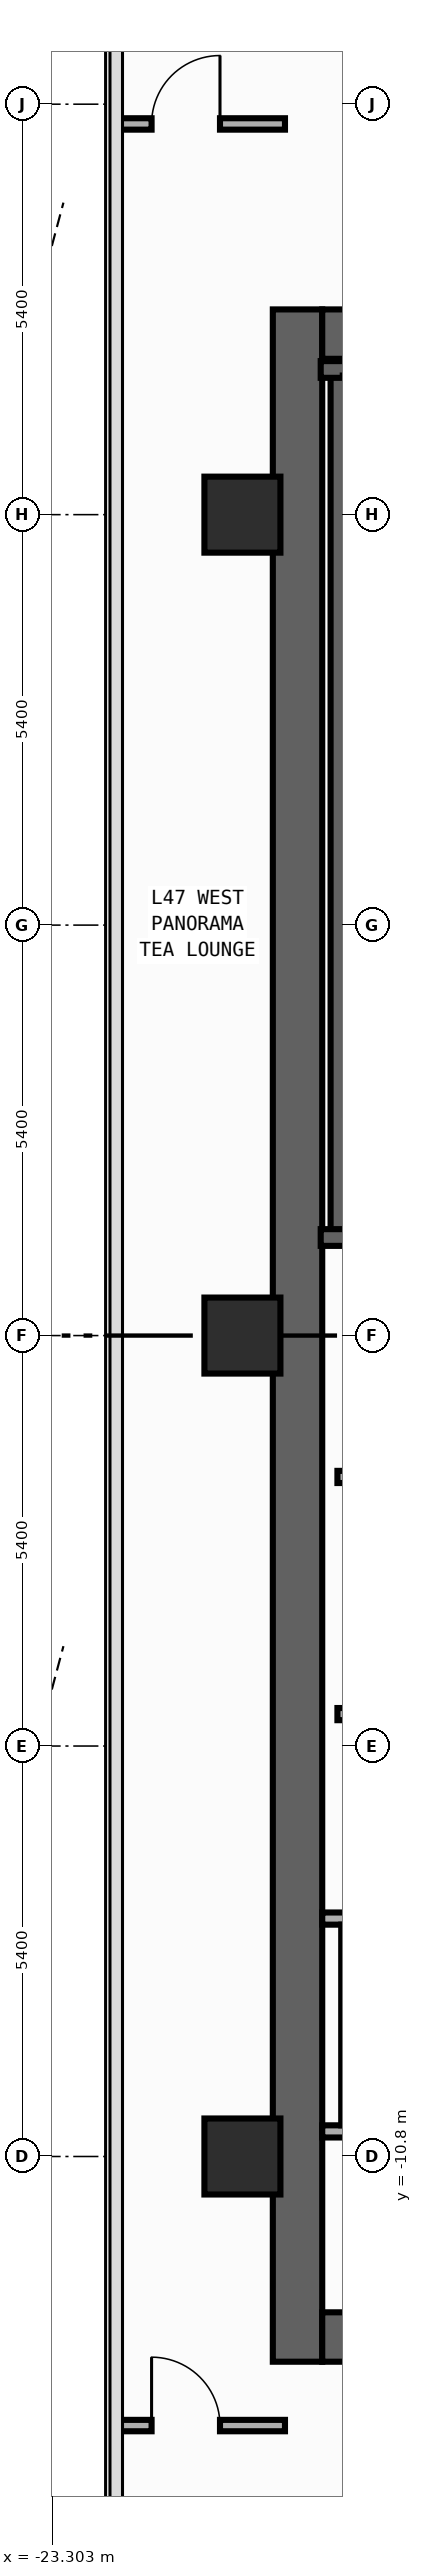
"""IFC4 building model, lengths in metres.
Left out: names, types, materials, properties, quantities, classifications, styles, units other than length and angle.
Written with IfcOpenShell. Run it as: python <this file> out.ifc"""

import sys

from ifc_helpers import new_model, si_unit, direction, frame, frame_2d, origin, origin_2d, place, context, subcontext, project, spatial, rectangle, extrude, element, fill, save


model = new_model("IFC4")
c1 = context("Model", 3, precision=1e-05, world=origin(), true_north=direction((0.0, 1.0)))
c2 = subcontext(c1, "Body", "Model", "MODEL_VIEW")
j1 = project(units=[si_unit("LENGTHUNIT", "METRE"), si_unit("PLANEANGLEUNIT", "RADIAN")], contexts=[c1])
p1 = place(None, origin())
s1 = spatial("IfcSite", under=j1, at=p1, CompositionType="ELEMENT")
p2 = place(p1, origin())
s2 = spatial("IfcBuilding", under=s1, at=p2, CompositionType="ELEMENT")
p3 = place(p2, frame((0.0, 0.0, 203.0)))
s3 = spatial("IfcBuildingStorey", under=s2, at=p3, CompositionType="ELEMENT", Elevation=203.0)
p4 = place(p3, frame((-20.075, -13.5, 0.0), z_axis=(0.0, 0.0, 1.0), x_axis=(0.0, 1.0, 0.0)))
e1 = element("IfcWall", 1, at=p4, inside=s3, PredefinedType="SHEAR", context=c2, shape_type="SweptSolid", body=[
    extrude(rectangle(XDim=27.0, YDim=0.65, at=frame_2d((13.5, 0.0))), origin(), (0.0, 0.0, 1.0), 3.54),
])
for number, where, z_axis, x_axis in (
    (2, (-19.75, -13.175, 0.0), (0.0, 0.0, 1.0), (1.0, 0.0, 0.0)),
    (3, (-19.75, 13.175, 0.0), (0.0, 0.0, 1.0), (1.0, 0.0, 0.0)),
):
    element("IfcWall", number, at=place(p3, frame(where, z_axis=z_axis, x_axis=x_axis)), inside=s3, PredefinedType="SHEAR", context=c2, shape_type="SweptSolid", body=[
        extrude(rectangle(XDim=7.1, YDim=0.65, at=frame_2d((3.55, 0.0))), origin(), (0.0, 0.0, 1.0), 3.54),
    ])
p5 = place(p3, frame((-19.53, 1.29, 0.0), z_axis=(0.0, 0.0, 1.0), x_axis=(0.0, 1.0, 0.0)))
e4 = element("IfcWall", 4, at=p5, inside=s3, PredefinedType="SHEAR", context=c2, shape_type="SweptSolid", body=[
    extrude(rectangle(XDim=11.42, YDim=0.22, at=frame_2d((5.71, 0.0))), origin(), (0.0, 0.0, 1.0), 3.54),
])
p6 = place(p3, frame((-19.77, 12.71, 0.0), z_axis=(0.0, 0.0, 1.0), x_axis=(1.0, 0.0, 0.0)))
e5 = element("IfcWall", 5, at=p6, inside=s3, PredefinedType="SHEAR", context=c2, shape_type="SweptSolid", body=[
    extrude(rectangle(XDim=4.065, YDim=0.22, at=frame_2d((2.032, 0.0))), origin(), (0.0, 0.0, 1.0), 3.54),
])
p7 = place(p3, frame((-19.77, 1.29, 0.0), z_axis=(0.0, 0.0, 1.0), x_axis=(1.0, 0.0, 0.0)))
e6 = element("IfcWall", 6, at=p7, inside=s3, PredefinedType="SHEAR", context=c2, shape_type="SweptSolid", body=[
    extrude(rectangle(XDim=4.065, YDim=0.22, at=frame_2d((2.032, 0.0))), origin(), (0.0, 0.0, 1.0), 3.54),
])
p8 = place(p7, frame((1.08, 0.0, 0.0)))
e7 = element("IfcOpeningElement", 7, at=p8, cuts=e6, PredefinedType="OPENING", context=c2, shape_type="SweptSolid", body=[
    extrude(rectangle(XDim=1.1, YDim=2.2, at=frame_2d((0.55, 1.1))), frame((0.0, 0.12, 0.0), z_axis=(0.0, -1.0, 0.0), x_axis=(1.0, 0.0, 0.0)), (0.0, 0.0, 1.0), 0.24),
])
for number, where, z_axis, x_axis in (
    (8, (-20.8, -10.8, 0.0), (0.0, 0.0, 1.0), (1.0, 0.0, 0.0)),
    (9, (-20.8, 0.0, 0.0), (0.0, 0.0, 1.0), (1.0, 0.0, 0.0)),
    (10, (-20.8, 10.8, 0.0), (0.0, 0.0, 1.0), (1.0, 0.0, 0.0)),
):
    element("IfcColumn", number, at=place(p3, frame(where, z_axis=z_axis, x_axis=x_axis)), inside=s3, PredefinedType="COLUMN", context=c2, shape_type="SweptSolid", body=[
        extrude(rectangle(XDim=1.0, YDim=1.0, at=origin_2d()), origin(), (0.0, 0.0, 1.0), 3.8),
    ])
p9 = place(p3, frame((-19.55, -1.86, 0.0), z_axis=(0.0, 0.0, 1.0), x_axis=(1.0, 0.0, 0.0)))
e11 = element("IfcWall", 11, at=p9, inside=s3, PredefinedType="STANDARD", context=c2, shape_type="SweptSolid", body=[
    extrude(rectangle(XDim=3.8, YDim=0.16, at=frame_2d((1.9, 0.0))), origin(), (0.0, 0.0, 1.0), 3.54),
])
p10 = place(p9, frame((1.18, 0.0, 0.0)))
e12 = element("IfcOpeningElement", 12, at=p10, cuts=e11, PredefinedType="OPENING", context=c2, shape_type="SweptSolid", body=[
    extrude(rectangle(XDim=1.15, YDim=2.2, at=frame_2d((0.575, 1.1))), frame((0.0, 0.09, 0.0), z_axis=(0.0, -1.0, 0.0), x_axis=(1.0, 0.0, 0.0)), (0.0, 0.0, 1.0), 0.18),
])
p11 = place(p3, frame((-19.55, -4.98, 0.0), z_axis=(0.0, 0.0, 1.0), x_axis=(1.0, 0.0, 0.0)))
e13 = element("IfcWall", 13, at=p11, inside=s3, PredefinedType="STANDARD", context=c2, shape_type="SweptSolid", body=[
    extrude(rectangle(XDim=3.8, YDim=0.16, at=frame_2d((1.9, 0.0))), origin(), (0.0, 0.0, 1.0), 3.54),
])
for number, where, z_axis, x_axis in (
    (14, (-19.75, -10.47, 0.0), (0.0, 0.0, 1.0), (1.0, 0.0, 0.0)),
    (15, (-19.75, -7.67, 0.0), (0.0, 0.0, 1.0), (1.0, 0.0, 0.0)),
):
    element("IfcWall", number, at=place(p3, frame(where, z_axis=z_axis, x_axis=x_axis)), inside=s3, PredefinedType="PARTITIONING", context=c2, shape_type="SweptSolid", body=[
        extrude(rectangle(XDim=2.44, YDim=0.16, at=frame_2d((1.22, 0.0))), origin(), (0.0, 0.0, 1.0), 3.54),
    ])
p12 = place(p3, frame((-22.455, 15.94, 0.0), z_axis=(0.0, 0.0, 1.0), x_axis=(1.0, 0.0, 0.0)))
e16 = element("IfcWall", 16, at=p12, inside=s3, PredefinedType="PARTITIONING", context=c2, shape_type="SweptSolid", body=[
    extrude(rectangle(XDim=2.215, YDim=0.15, at=frame_2d((1.107, 0.0))), origin(), (0.0, 0.0, 1.0), 3.54),
])
p13 = place(p12, frame((0.46, 0.0, 0.0)))
e17 = element("IfcOpeningElement", 17, at=p13, cuts=e16, PredefinedType="OPENING", context=c2, shape_type="SweptSolid", body=[
    extrude(rectangle(XDim=0.9, YDim=2.15, at=frame_2d((0.45, 1.075))), frame((0.0, 0.085, 0.0), z_axis=(0.0, -1.0, 0.0), x_axis=(1.0, 0.0, 0.0)), (0.0, 0.0, 1.0), 0.17),
])
p14 = place(p3, frame((-22.455, -14.34, 0.0), z_axis=(0.0, 0.0, 1.0), x_axis=(1.0, 0.0, 0.0)))
e18 = element("IfcWall", 18, at=p14, inside=s3, PredefinedType="PARTITIONING", context=c2, shape_type="SweptSolid", body=[
    extrude(rectangle(XDim=2.215, YDim=0.15, at=frame_2d((1.107, 0.0))), origin(), (0.0, 0.0, 1.0), 3.54),
])
p15 = place(p14, frame((0.46, 0.0, 0.0)))
e19 = element("IfcOpeningElement", 19, at=p15, cuts=e18, PredefinedType="OPENING", context=c2, shape_type="SweptSolid", body=[
    extrude(rectangle(XDim=0.9, YDim=2.15, at=frame_2d((0.45, 1.075))), frame((0.0, 0.085, 0.0), z_axis=(0.0, -1.0, 0.0), x_axis=(1.0, 0.0, 0.0)), (0.0, 0.0, 1.0), 0.17),
])
p16 = place(p3, frame((-19.45, -10.39, 0.0), z_axis=(0.0, 0.0, 1.0), x_axis=(0.0, 1.0, 0.0)))
e20 = element("IfcWall", 20, at=p16, inside=s3, PredefinedType="PARTITIONING", context=c2, shape_type="SweptSolid", body=[
    extrude(rectangle(XDim=2.64, YDim=0.1, at=frame_2d((1.32, 0.0))), origin(), (0.0, 0.0, 1.0), 3.54),
])
p17 = place(p13, origin())
e21 = element("IfcDoor", 21, at=p17, inside=s3, OperationType="SINGLE_SWING_RIGHT", PredefinedType="DOOR", context=c2, shape_type="SweptSolid", body=[
    extrude(rectangle(XDim=0.9, YDim=2.15, at=frame_2d((0.45, 1.075))), frame((0.0, 0.025, 0.0), z_axis=(0.0, -1.0, 0.0), x_axis=(1.0, 0.0, 0.0)), (0.0, 0.0, 1.0), 0.05),
])
fill(e17, e21)
p18 = place(p15, origin())
e22 = element("IfcDoor", 22, at=p18, inside=s3, OperationType="SINGLE_SWING_LEFT", PredefinedType="DOOR", context=c2, shape_type="SweptSolid", body=[
    extrude(rectangle(XDim=0.9, YDim=2.15, at=frame_2d((0.45, 1.075))), frame((0.0, 0.025, 0.0), z_axis=(0.0, -1.0, 0.0), x_axis=(1.0, 0.0, 0.0)), (0.0, 0.0, 1.0), 0.05),
])
fill(e19, e22)
save(model, sys.argv[1])
